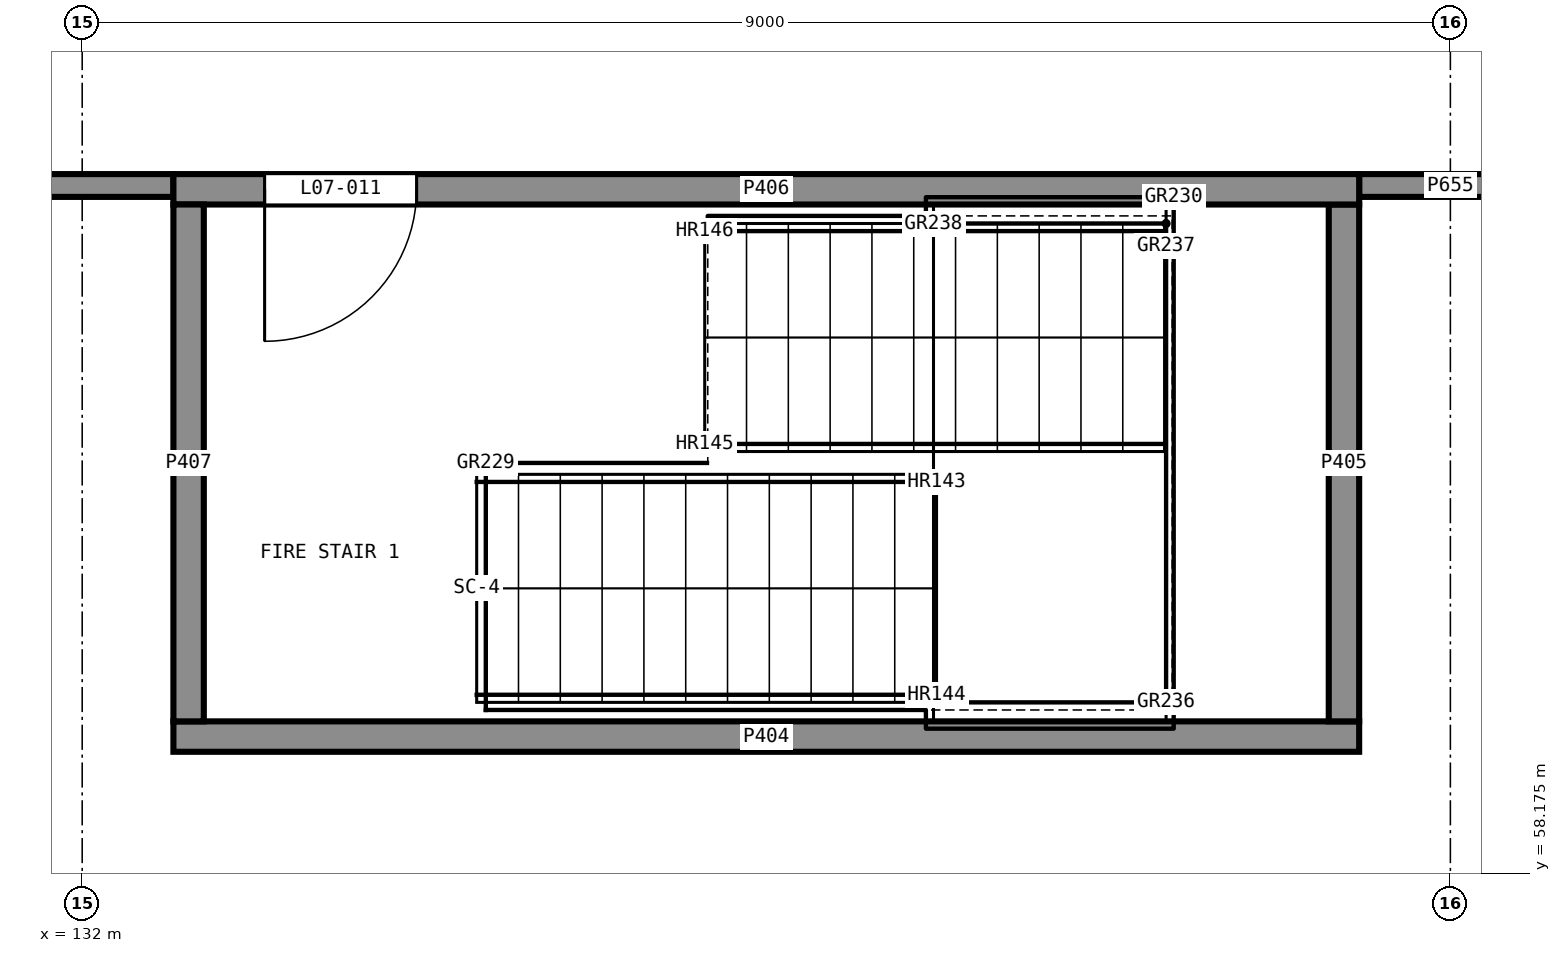
"""IFC4 building model, lengths in metres.
Left out: names, types, materials, properties, quantities, classifications, styles, units other than length and angle.
Written with IfcOpenShell. Run it as: python <this file> out.ifc"""

import sys

from ifc_helpers import new_model, si_unit, direction, frame, frame_2d, origin, place, context, subcontext, project, spatial, rectangle, extrude, element, fill, save


model = new_model("IFC4")
c1 = context("Model", 3, precision=1e-05, world=origin(), true_north=direction((0.0, 1.0)))
c2 = subcontext(c1, "Body", "Model", "MODEL_VIEW")
j1 = project(units=[si_unit("LENGTHUNIT", "METRE"), si_unit("PLANEANGLEUNIT", "RADIAN")], contexts=[c1])
p1 = place(None, origin())
s1 = spatial("IfcSite", under=j1, at=p1, CompositionType="ELEMENT")
p2 = place(p1, origin())
s2 = spatial("IfcBuilding", under=s1, at=p2, CompositionType="ELEMENT")
p3 = place(p2, frame((0.0, 0.0, 29.5)))
s3 = spatial("IfcBuildingStorey", under=s2, at=p3, CompositionType="ELEMENT", Elevation=29.5)
p4 = place(p3, frame((132.6, 59.075, 0.0), z_axis=(0.0, 0.0, 1.0), x_axis=(1.0, 0.0, 0.0)))
e1 = element("IfcWall", 1, at=p4, inside=s3, PredefinedType="SHEAR", context=c2, shape_type="SweptSolid", body=[
    extrude(rectangle(XDim=7.8, YDim=0.2, at=frame_2d((3.9, 0.0))), origin(), (0.0, 0.0, 1.0), 3.75),
])
p5 = place(p3, frame((140.3, 59.175, 0.0), z_axis=(0.0, 0.0, 1.0), x_axis=(0.0, 1.0, 0.0)))
e2 = element("IfcWall", 2, at=p5, inside=s3, PredefinedType="SHEAR", context=c2, shape_type="SweptSolid", body=[
    extrude(rectangle(XDim=3.4, YDim=0.2, at=frame_2d((1.7, 0.0))), origin(), (0.0, 0.0, 1.0), 3.75),
])
p6 = place(p3, frame((140.4, 62.675, 0.0), z_axis=(0.0, 0.0, 1.0), x_axis=(-1.0, 0.0, 0.0)))
e3 = element("IfcWall", 3, at=p6, inside=s3, PredefinedType="SHEAR", context=c2, shape_type="SweptSolid", body=[
    extrude(rectangle(XDim=7.8, YDim=0.2, at=frame_2d((3.9, 0.0))), origin(), (0.0, 0.0, 1.0), 3.75),
])
p7 = place(p6, frame((6.2, 0.0, 0.0)))
e4 = element("IfcOpeningElement", 4, at=p7, cuts=e3, PredefinedType="OPENING", context=c2, shape_type="SweptSolid", body=[
    extrude(rectangle(XDim=1.0, YDim=2.1, at=frame_2d((0.5, 1.05))), frame((0.0, 0.11, 0.0), z_axis=(0.0, -1.0, 0.0), x_axis=(1.0, 0.0, 0.0)), (0.0, 0.0, 1.0), 0.22),
])
p8 = place(p3, frame((132.7, 62.575, 0.0), z_axis=(0.0, 0.0, 1.0), x_axis=(0.0, -1.0, 0.0)))
e5 = element("IfcWall", 5, at=p8, inside=s3, PredefinedType="SHEAR", context=c2, shape_type="SweptSolid", body=[
    extrude(rectangle(XDim=3.4, YDim=0.2, at=frame_2d((1.7, 0.0))), origin(), (0.0, 0.0, 1.0), 3.75),
])
p9 = place(p3, frame((132.6, 62.7, 0.0), z_axis=(0.0, 0.0, 1.0), x_axis=(-1.0, 0.0, 0.0)))
e6 = element("IfcWall", 6, at=p9, inside=s3, PredefinedType="PARTITIONING", context=c2, shape_type="SweptSolid", body=[
    extrude(rectangle(XDim=11.825, YDim=0.15, at=frame_2d((5.913, 0.0))), origin(), (0.0, 0.0, 1.0), 3.75),
])
p10 = place(p9, frame((9.3, 0.0, 0.0)))
e7 = element("IfcOpeningElement", 7, at=p10, cuts=e6, PredefinedType="OPENING", context=c2, shape_type="SweptSolid", body=[
    extrude(rectangle(XDim=1.0, YDim=2.1, at=frame_2d((0.5, 1.05))), frame((0.0, 0.085, 0.0), z_axis=(0.0, -1.0, 0.0), x_axis=(1.0, 0.0, 0.0)), (0.0, 0.0, 1.0), 0.17),
])
p11 = place(p9, frame((5.427, 0.0, 0.0)))
e8 = element("IfcOpeningElement", 8, at=p11, cuts=e6, PredefinedType="OPENING", context=c2, shape_type="SweptSolid", body=[
    extrude(rectangle(XDim=1.0, YDim=2.1, at=frame_2d((0.5, 1.05))), frame((0.0, 0.085, 0.0), z_axis=(0.0, -1.0, 0.0), x_axis=(1.0, 0.0, 0.0)), (0.0, 0.0, 1.0), 0.17),
])
p12 = place(p3, frame((141.6, 62.7, 0.0), z_axis=(0.0, 0.0, 1.0), x_axis=(-1.0, 0.0, 0.0)))
e9 = element("IfcWall", 9, at=p12, inside=s3, PredefinedType="PARTITIONING", context=c2, shape_type="SweptSolid", body=[
    extrude(rectangle(XDim=1.2, YDim=0.15, at=frame_2d((0.6, 0.0))), origin(), (0.0, 0.0, 1.0), 3.75),
])
p13 = place(p7, origin())
e10 = element("IfcDoor", 10, at=p13, inside=s3, OperationType="SINGLE_SWING_LEFT", PredefinedType="DOOR", context=c2, shape_type="SweptSolid", body=[
    extrude(rectangle(XDim=1.0, YDim=2.1, at=frame_2d((0.5, 1.05))), frame((0.0, 0.025, 0.0), z_axis=(0.0, -1.0, 0.0), x_axis=(1.0, 0.0, 0.0)), (0.0, 0.0, 1.0), 0.05),
])
fill(e4, e10)
save(model, sys.argv[1])
